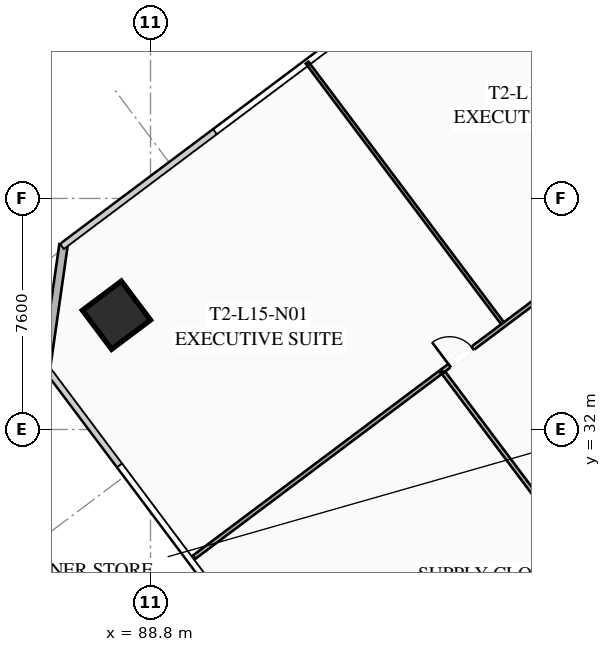
"""IFC4 building model, lengths in metres.
Left out: names, types, materials, properties, quantities, classifications, styles, units other than length and angle.
Written with IfcOpenShell. Run it as: python <this file> out.ifc"""

import sys

from ifc_helpers import new_model, si_unit, direction, frame, frame_2d, origin, origin_2d, place, context, subcontext, project, spatial, rectangle, hollow_rectangle, extrude, element, fill, save


model = new_model("IFC4")
c1 = context("Model", 3, precision=1e-05, world=origin(), true_north=direction((0.0, 1.0)))
c2 = subcontext(c1, "Body", "Model", "MODEL_VIEW")
j1 = project(units=[si_unit("LENGTHUNIT", "METRE"), si_unit("PLANEANGLEUNIT", "RADIAN")], contexts=[c1])
p1 = place(None, origin())
s1 = spatial("IfcSite", under=j1, at=p1, CompositionType="ELEMENT")
p2 = place(p1, origin())
s2 = spatial("IfcBuilding", under=s1, at=p2, CompositionType="ELEMENT")
p3 = place(p2, frame((0.0, 0.0, 60.1)))
s3 = spatial("IfcBuildingStorey", under=s2, at=p3, CompositionType="ELEMENT", Elevation=60.1)
p4 = place(p3, frame((87.68, 35.76, 0.0), z_axis=(0.0, 0.0, 1.0), x_axis=(0.799999996291, 0.600000004945, 0.0)))
e1 = element("IfcColumn", 1, at=p4, inside=s3, PredefinedType="COLUMN", context=c2, shape_type="SweptSolid", body=[
    extrude(hollow_rectangle(XDim=1.6, YDim=1.6, WallThickness=0.06, at=origin_2d()), origin(), (0.0, 0.0, 1.0), 3.35),
])
p5 = place(p3, frame((85.36, 34.02, 0.0), z_axis=(0.0, 0.0, 1.0), x_axis=(0.14137968631, 0.989955445613, 0.0)))
e2 = element("IfcWall", 2, at=p5, inside=s3, PredefinedType="SOLIDWALL", context=c2, shape_type="SweptSolid", body=[
    extrude(rectangle(XDim=4.101, YDim=0.28, at=frame_2d((2.051, 0.0))), origin(), (0.0, 0.0, 1.0), 3.35),
])
p6 = place(p3, frame((98.396, 33.922, 0.0), z_axis=(0.0, 0.0, 1.0), x_axis=(0.800001954438, 0.599997394074, 0.0)))
e3 = element("IfcWall", 3, at=p6, inside=s3, PredefinedType="PARTITIONING", context=c2, shape_type="SweptSolid", body=[
    extrude(rectangle(XDim=29.98, YDim=0.135, at=frame_2d((14.99, 0.0))), origin(), (0.0, 0.0, 1.0), 2.703),
])
p7 = place(p6, frame((0.3, 0.0, 0.0)))
e4 = element("IfcOpeningElement", 4, at=p7, cuts=e3, PredefinedType="OPENING", context=c2, shape_type="SweptSolid", body=[
    extrude(rectangle(XDim=0.95, YDim=2.05, at=frame_2d((0.475, 1.025))), frame((0.0, 0.077, 0.0), z_axis=(0.0, -1.0, 0.0), x_axis=(1.0, 0.0, 0.0)), (0.0, 0.0, 1.0), 0.155),
])
p8 = place(p6, frame((11.143, 0.0, 0.0)))
e5 = element("IfcOpeningElement", 5, at=p8, cuts=e3, PredefinedType="OPENING", context=c2, shape_type="SweptSolid", body=[
    extrude(rectangle(XDim=0.95, YDim=2.05, at=frame_2d((0.475, 1.025))), frame((0.0, 0.077, 0.0), z_axis=(0.0, -1.0, 0.0), x_axis=(1.0, 0.0, 0.0)), (0.0, 0.0, 1.0), 0.155),
])
p9 = place(p6, frame((28.73, 0.0, 0.0)))
e6 = element("IfcOpeningElement", 6, at=p9, cuts=e3, PredefinedType="OPENING", context=c2, shape_type="SweptSolid", body=[
    extrude(rectangle(XDim=0.95, YDim=2.05, at=frame_2d((0.475, 1.025))), frame((0.0, 0.077, 0.0), z_axis=(0.0, -1.0, 0.0), x_axis=(1.0, 0.0, 0.0)), (0.0, 0.0, 1.0), 0.155),
])
p10 = place(p3, frame((100.372, 35.504, 0.0), z_axis=(0.0, 0.0, 1.0), x_axis=(-0.600007301277, 0.79999452399, 0.0)))
e7 = element("IfcWall", 7, at=p10, inside=s3, PredefinedType="PARTITIONING", context=c2, shape_type="SweptSolid", body=[
    extrude(rectangle(XDim=10.7, YDim=0.11, at=frame_2d((5.35, 0.0))), origin(), (0.0, 0.0, 1.0), 2.703),
])
p11 = place(p3, frame((111.428, 16.546, 0.0), z_axis=(0.0, 0.0, 1.0), x_axis=(-0.599996389772, 0.800002707659, 0.0)))
e8 = element("IfcWall", 8, at=p11, inside=s3, PredefinedType="PARTITIONING", context=c2, shape_type="SweptSolid", body=[
    extrude(rectangle(XDim=21.64, YDim=0.135, at=frame_2d((10.82, 0.0))), origin(), (0.0, 0.0, 1.0), 2.703),
])
p12 = place(p11, frame((0.3, 0.0, 0.0)))
e9 = element("IfcOpeningElement", 9, at=p12, cuts=e8, PredefinedType="OPENING", context=c2, shape_type="SweptSolid", body=[
    extrude(rectangle(XDim=0.95, YDim=2.05, at=frame_2d((0.475, 1.025))), frame((0.0, 0.077, 0.0), z_axis=(0.0, -1.0, 0.0), x_axis=(1.0, 0.0, 0.0)), (0.0, 0.0, 1.0), 0.155),
])
p13 = place(p3, frame((98.332, 33.874, 0.0), z_axis=(0.0, 0.0, 1.0), x_axis=(-0.799997105034, -0.600003859935, 0.0)))
e10 = element("IfcWall", 10, at=p13, inside=s3, PredefinedType="PARTITIONING", context=c2, shape_type="SweptSolid", body=[
    extrude(rectangle(XDim=10.12, YDim=0.135, at=frame_2d((5.06, 0.0))), origin(), (0.0, 0.0, 1.0), 2.703),
])
p14 = place(p7, origin())
e11 = element("IfcDoor", 11, at=p14, inside=s3, OperationType="SINGLE_SWING_LEFT", PredefinedType="DOOR", context=c2, shape_type="SweptSolid", body=[
    extrude(rectangle(XDim=0.95, YDim=2.05, at=frame_2d((0.475, 1.025))), frame((0.0, 0.025, 0.0), z_axis=(0.0, -1.0, 0.0), x_axis=(1.0, 0.0, 0.0)), (0.0, 0.0, 1.0), 0.05),
])
fill(e4, e11)
save(model, sys.argv[1])
